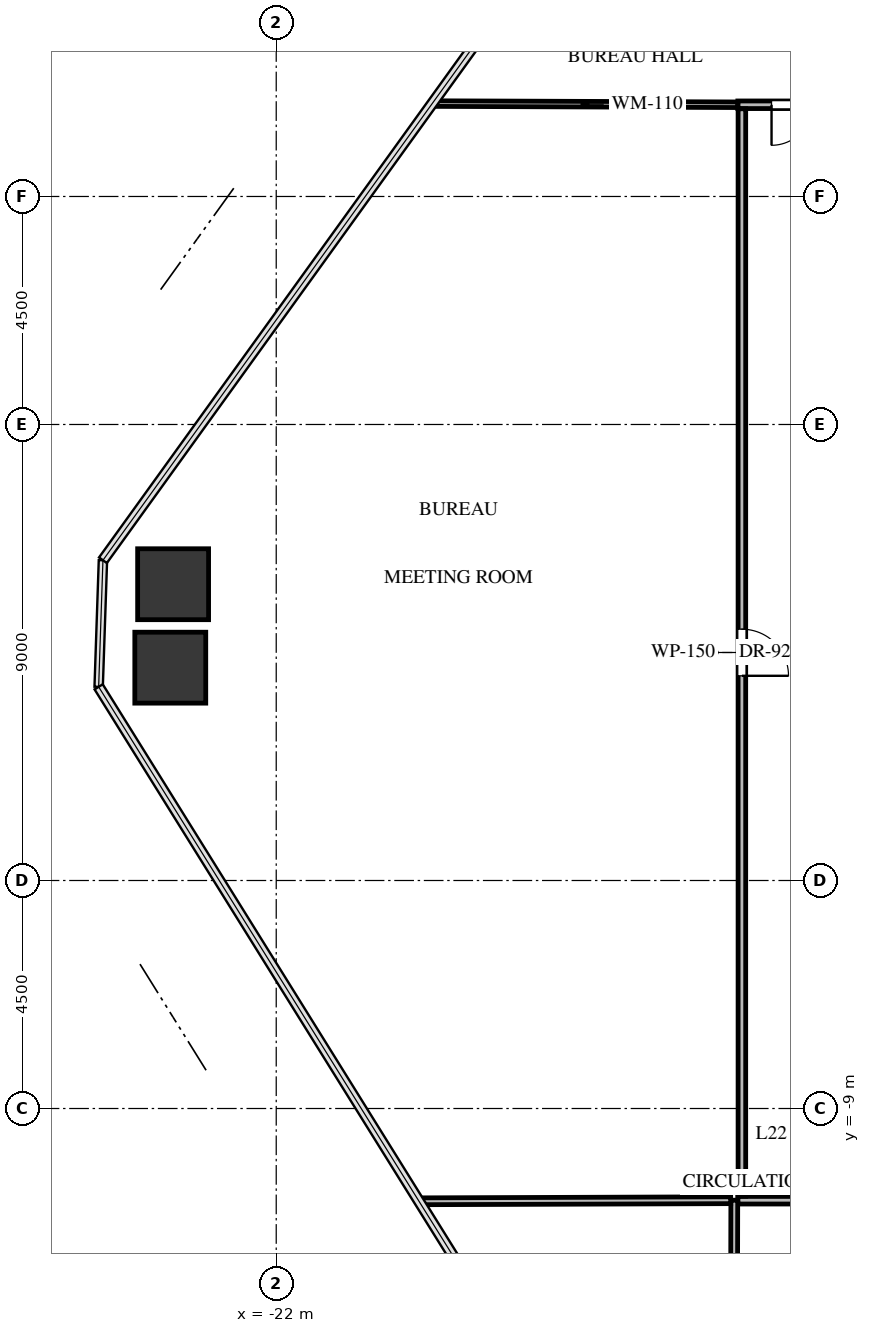
"""IFC4 building model, lengths in metres.
Left out: names, types, materials, properties, quantities, classifications, styles, units other than length and angle.
Written with IfcOpenShell. Run it as: python <this file> out.ifc"""

import sys

from ifc_helpers import new_model, si_unit, direction, frame, frame_2d, origin, origin_2d, place, context, subcontext, project, spatial, rectangle, extrude, source, transform, mapped, element, fill, save


model = new_model("IFC4")
c1 = context("Model", 3, precision=1e-05, world=origin(), true_north=direction((0.0, 1.0)))
c2 = subcontext(c1, "Body", "Model", "MODEL_VIEW")
j1 = project(units=[si_unit("LENGTHUNIT", "METRE"), si_unit("PLANEANGLEUNIT", "RADIAN")], contexts=[c1])
p1 = place(None, origin())
s1 = spatial("IfcSite", under=j1, at=p1, CompositionType="ELEMENT")
p2 = place(p1, origin())
s2 = spatial("IfcBuilding", under=s1, at=p2, CompositionType="ELEMENT")
p3 = place(p2, frame((0.0, 0.0, 84.3)))
s3 = spatial("IfcBuildingStorey", under=s2, at=p3, CompositionType="ELEMENT", Elevation=84.3)
m1 = source(origin(), c2, "Body", "SweptSolid", [
    extrude(rectangle(XDim=1.4, YDim=1.4, at=origin_2d()), origin(), (0.0, 0.0, 1.0), 4.14),
])
for number, where, z_axis, x_axis in (
    (1, (-24.091, -0.3, -0.24), (0.0, 0.0, 1.0), (1.0, 0.0, 0.0)),
    (2, (-24.035, 1.347, -0.24), (0.0, 0.0, 1.0), (1.0, 0.0, 0.0)),
):
    element("IfcColumn", number, at=place(p3, frame(where, z_axis=z_axis, x_axis=x_axis)), inside=s3, PredefinedType="COLUMN", context=c2, shape_type="MappedRepresentation", body=[
        mapped(m1, transform((0.0, 0.0, 0.0), x_axis=(1.0, 0.0, 0.0), y_axis=(0.0, 1.0, 0.0), z_axis=(0.0, 0.0, 1.0), scale=1.0)),
    ])
p4 = place(p3, frame((-9.96, 10.81, 0.0), z_axis=(0.0, 0.0, 1.0), x_axis=(-1.0, 0.0, 0.0)))
e3 = element("IfcWall", 3, at=p4, inside=s3, PredefinedType="PARTITIONING", context=c2, shape_type="SweptSolid", body=[
    extrude(rectangle(XDim=2.93, YDim=0.15, at=frame_2d((1.465, 0.0))), origin(), (0.0, 0.0, 1.0), 3.885),
])
p5 = place(p4, frame((0.665, 0.0, 0.0)))
e4 = element("IfcOpeningElement", 4, at=p5, cuts=e3, PredefinedType="OPENING", context=c2, shape_type="SweptSolid", body=[
    extrude(rectangle(XDim=1.6, YDim=2.15, at=frame_2d((0.8, 1.075))), frame((0.0, 0.085, 0.0), z_axis=(0.0, -1.0, 0.0), x_axis=(1.0, 0.0, 0.0)), (0.0, 0.0, 1.0), 0.17),
])
p6 = place(p3, frame((-12.89, -10.81, 0.0), z_axis=(0.0, 0.0, 1.0), x_axis=(1.0, 0.0, 0.0)))
e5 = element("IfcWall", 5, at=p6, inside=s3, PredefinedType="PARTITIONING", context=c2, shape_type="SweptSolid", body=[
    extrude(rectangle(XDim=8.93, YDim=0.15, at=frame_2d((4.465, 0.0))), origin(), (0.0, 0.0, 1.0), 2.32),
])
p7 = place(p6, frame((4.005, 0.0, 0.0)))
e6 = element("IfcOpeningElement", 6, at=p7, cuts=e5, PredefinedType="OPENING", context=c2, shape_type="SweptSolid", body=[
    extrude(rectangle(XDim=0.92, YDim=2.1, at=frame_2d((0.46, 1.05))), frame((0.0, 0.085, 0.0), z_axis=(0.0, -1.0, 0.0), x_axis=(1.0, 0.0, 0.0)), (0.0, 0.0, 1.0), 0.17),
])
p8 = place(p3, frame((-12.81, 10.731, 0.0), z_axis=(0.0, 0.0, 1.0), x_axis=(0.0, -1.0, 0.0)))
e7 = element("IfcWall", 7, at=p8, inside=s3, PredefinedType="PARTITIONING", context=c2, shape_type="SweptSolid", body=[
    extrude(rectangle(XDim=21.462, YDim=0.15, at=frame_2d((10.731, 0.0))), origin(), (0.0, 0.0, 1.0), 2.32),
])
p9 = place(p8, frame((10.271, 0.0, 0.0)))
e8 = element("IfcOpeningElement", 8, at=p9, cuts=e7, PredefinedType="OPENING", context=c2, shape_type="SweptSolid", body=[
    extrude(rectangle(XDim=0.92, YDim=2.1, at=frame_2d((0.46, 1.05))), frame((0.0, 0.085, 0.0), z_axis=(0.0, -1.0, 0.0), x_axis=(1.0, 0.0, 0.0)), (0.0, 0.0, 1.0), 0.17),
])
p10 = place(p3, frame((-12.89, 10.81, 0.0), z_axis=(0.0, 0.0, 1.0), x_axis=(-0.999992607823, 0.003845035728, 0.0)))
e9 = element("IfcWall", 9, at=p10, inside=s3, PredefinedType="MOVABLE", context=c2, shape_type="SweptSolid", body=[
    extrude(rectangle(XDim=6.032, YDim=0.11, at=frame_2d((3.016, 0.0))), origin(), (0.0, 0.0, 1.0), 2.32),
])
p11 = place(p3, frame((-12.96, -10.81, 0.0), z_axis=(0.0, 0.0, 1.0), x_axis=(-0.002186743077, -0.999997609074, 0.0)))
e10 = element("IfcWall", 10, at=p11, inside=s3, PredefinedType="PARTITIONING", context=c2, shape_type="SweptSolid", body=[
    extrude(rectangle(XDim=8.932, YDim=0.135, at=frame_2d((4.466, 0.0))), origin(), (0.0, 0.0, 1.0), 2.32),
])
p12 = place(p11, frame((4.016, 0.0, 0.0)))
e11 = element("IfcOpeningElement", 11, at=p12, cuts=e10, PredefinedType="OPENING", context=c2, shape_type="SweptSolid", body=[
    extrude(rectangle(XDim=0.9, YDim=2.05, at=frame_2d((0.45, 1.025))), frame((0.0, 0.078, 0.0), z_axis=(0.0, -1.0, 0.0), x_axis=(1.0, 0.0, 0.0)), (0.0, 0.0, 1.0), 0.155),
])
p13 = place(p3, frame((-19.182, -10.831, 0.0), z_axis=(0.0, 0.0, 1.0), x_axis=(0.999994173559, 0.003413626758, 0.0)))
e12 = element("IfcWall", 12, at=p13, inside=s3, PredefinedType="PARTITIONING", context=c2, shape_type="SweptSolid", body=[
    extrude(rectangle(XDim=6.151, YDim=0.135, at=frame_2d((3.075, 0.0))), origin(), (0.0, 0.0, 1.0), 2.32),
])
m2 = source(origin(), c2, "Body", "SweptSolid", [
    extrude(rectangle(XDim=1.6, YDim=2.15, at=frame_2d((0.8, 1.075))), frame((0.0, 0.025, 0.0), z_axis=(0.0, -1.0, 0.0), x_axis=(1.0, 0.0, 0.0)), (0.0, 0.0, 1.0), 0.05),
])
p14 = place(p5, origin())
e13 = element("IfcDoor", 13, at=p14, inside=s3, OperationType="DOUBLE_DOOR_SINGLE_SWING", PredefinedType="DOOR", context=c2, shape_type="MappedRepresentation", body=[
    mapped(m2, transform((0.0, 0.0, 0.0), x_axis=(1.0, 0.0, 0.0), y_axis=(0.0, 1.0, 0.0), z_axis=(0.0, 0.0, 1.0), scale=1.0)),
])
fill(e4, e13)
m3 = source(origin(), c2, "Body", "SweptSolid", [
    extrude(rectangle(XDim=0.92, YDim=2.1, at=frame_2d((0.46, 1.05))), frame((0.0, 0.025, 0.0), z_axis=(0.0, -1.0, 0.0), x_axis=(1.0, 0.0, 0.0)), (0.0, 0.0, 1.0), 0.05),
])
p15 = place(p9, origin())
e14 = element("IfcDoor", 14, at=p15, inside=s3, OperationType="SINGLE_SWING_RIGHT", PredefinedType="DOOR", context=c2, shape_type="MappedRepresentation", body=[
    mapped(m3, transform((0.0, 0.0, 0.0), x_axis=(1.0, 0.0, 0.0), y_axis=(0.0, 1.0, 0.0), z_axis=(0.0, 0.0, 1.0), scale=1.0)),
])
fill(e8, e14)
save(model, sys.argv[1])
